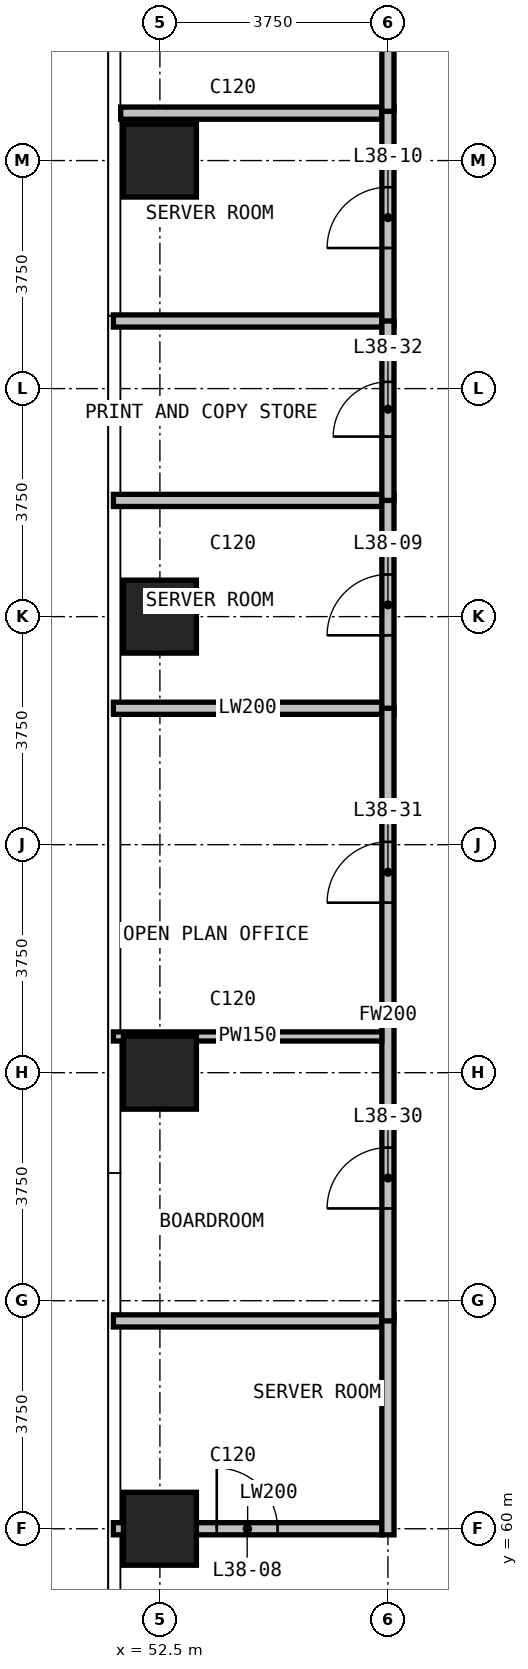
"""IFC4 building model, lengths in metres.
Left out: names, types, materials, properties, quantities, classifications, styles, units other than length and angle.
Written with IfcOpenShell. Run it as: python <this file> out.ifc"""

import sys

from ifc_helpers import new_model, si_unit, direction, frame, frame_2d, origin, origin_2d, place, context, subcontext, project, spatial, rectangle, extrude, element, fill, save


model = new_model("IFC4")
c1 = context("Model", 3, precision=1e-05, world=origin(), true_north=direction((0.0, 1.0)))
c2 = subcontext(c1, "Body", "Model", "MODEL_VIEW")
j1 = project(units=[si_unit("LENGTHUNIT", "METRE"), si_unit("PLANEANGLEUNIT", "RADIAN")], contexts=[c1])
p1 = place(None, origin())
s1 = spatial("IfcSite", under=j1, at=p1, CompositionType="ELEMENT")
p2 = place(p1, origin())
s2 = spatial("IfcBuilding", under=s1, at=p2, CompositionType="ELEMENT")
p3 = place(p2, frame((0.0, 0.0, 151.3)))
s3 = spatial("IfcBuildingStorey", under=s2, at=p3, CompositionType="ELEMENT", Elevation=151.3)
for number, where, z_axis, x_axis in (
    (1, (52.5, 60.0, 0.0), (0.0, 0.0, 1.0), (1.0, 0.0, 0.0)),
    (2, (52.5, 67.5, 0.0), (0.0, 0.0, 1.0), (1.0, 0.0, 0.0)),
    (3, (52.5, 75.0, 0.0), (0.0, 0.0, 1.0), (1.0, 0.0, 0.0)),
    (4, (52.5, 82.5, 0.0), (0.0, 0.0, 1.0), (1.0, 0.0, 0.0)),
):
    element("IfcColumn", number, at=place(p3, frame(where, z_axis=z_axis, x_axis=x_axis)), inside=s3, PredefinedType="COLUMN", context=c2, shape_type="SweptSolid", body=[
        extrude(rectangle(XDim=1.2, YDim=1.2, at=origin_2d()), origin(), (0.0, 0.0, 1.0), 3.6),
    ])
p4 = place(p3, frame((51.735, 60.0, 0.0), z_axis=(0.0, 0.0, 1.0), x_axis=(1.0, 0.0, 0.0)))
e5 = element("IfcWall", 5, at=p4, inside=s3, PredefinedType="PARTITIONING", context=c2, shape_type="SweptSolid", body=[
    extrude(rectangle(XDim=4.415, YDim=0.2, at=frame_2d((2.208, 0.0))), origin(), (0.0, 0.0, 1.0), 3.3),
])
p5 = place(p4, frame((1.7, 0.0, 0.0)))
e6 = element("IfcOpeningElement", 6, at=p5, cuts=e5, PredefinedType="OPENING", context=c2, shape_type="SweptSolid", body=[
    extrude(rectangle(XDim=1.0, YDim=2.2, at=frame_2d((0.5, 1.1))), frame((0.0, 0.11, 0.0), z_axis=(0.0, -1.0, 0.0), x_axis=(1.0, 0.0, 0.0)), (0.0, 0.0, 1.0), 0.22),
])
for number, where, z_axis, x_axis in (
    (7, (51.735, 63.418, 0.0), (0.0, 0.0, 1.0), (1.0, 0.0, 0.0)),
    (8, (51.735, 73.493, 0.0), (0.0, 0.0, 1.0), (1.0, 0.0, 0.0)),
    (9, (51.735, 76.911, 0.0), (0.0, 0.0, 1.0), (1.0, 0.0, 0.0)),
    (10, (51.735, 79.862, 0.0), (0.0, 0.0, 1.0), (1.0, 0.0, 0.0)),
):
    element("IfcWall", number, at=place(p3, frame(where, z_axis=z_axis, x_axis=x_axis)), inside=s3, PredefinedType="PARTITIONING", context=c2, shape_type="SweptSolid", body=[
        extrude(rectangle(XDim=4.415, YDim=0.2, at=frame_2d((2.208, 0.0))), origin(), (0.0, 0.0, 1.0), 3.3),
    ])
p6 = place(p3, frame((51.855, 83.28, 0.0), z_axis=(0.0, 0.0, 1.0), x_axis=(1.0, 0.0, 0.0)))
e11 = element("IfcWall", 11, at=p6, inside=s3, PredefinedType="PARTITIONING", context=c2, shape_type="SweptSolid", body=[
    extrude(rectangle(XDim=4.295, YDim=0.2, at=frame_2d((2.147, 0.0))), origin(), (0.0, 0.0, 1.0), 3.3),
])
p7 = place(p3, frame((56.25, 59.9, 0.0), z_axis=(0.0, 0.0, 1.0), x_axis=(0.0, 1.0, 0.0)))
e12 = element("IfcWall", 12, at=p7, inside=s3, PredefinedType="PARTITIONING", context=c2, shape_type="SweptSolid", body=[
    extrude(rectangle(XDim=3.618, YDim=0.2, at=frame_2d((1.809, 0.0))), origin(), (0.0, 0.0, 1.0), 3.3),
])
p8 = place(p3, frame((56.25, 73.393, 0.0), z_axis=(0.0, 0.0, 1.0), x_axis=(0.0, 1.0, 0.0)))
e13 = element("IfcWall", 13, at=p8, inside=s3, PredefinedType="PARTITIONING", context=c2, shape_type="SweptSolid", body=[
    extrude(rectangle(XDim=3.618, YDim=0.2, at=frame_2d((1.809, 0.0))), origin(), (0.0, 0.0, 1.0), 3.3),
])
p9 = place(p8, frame((1.3, 0.0, 0.0)))
e14 = element("IfcOpeningElement", 14, at=p9, cuts=e13, PredefinedType="OPENING", context=c2, shape_type="SweptSolid", body=[
    extrude(rectangle(XDim=1.0, YDim=2.2, at=frame_2d((0.5, 1.1))), frame((0.0, 0.11, 0.0), z_axis=(0.0, -1.0, 0.0), x_axis=(1.0, 0.0, 0.0)), (0.0, 0.0, 1.0), 0.22),
])
p10 = place(p3, frame((56.25, 79.762, 0.0), z_axis=(0.0, 0.0, 1.0), x_axis=(0.0, 1.0, 0.0)))
e15 = element("IfcWall", 15, at=p10, inside=s3, PredefinedType="PARTITIONING", context=c2, shape_type="SweptSolid", body=[
    extrude(rectangle(XDim=3.618, YDim=0.2, at=frame_2d((1.809, 0.0))), origin(), (0.0, 0.0, 1.0), 3.3),
])
p11 = place(p10, frame((1.3, 0.0, 0.0)))
e16 = element("IfcOpeningElement", 16, at=p11, cuts=e15, PredefinedType="OPENING", context=c2, shape_type="SweptSolid", body=[
    extrude(rectangle(XDim=1.0, YDim=2.2, at=frame_2d((0.5, 1.1))), frame((0.0, 0.11, 0.0), z_axis=(0.0, -1.0, 0.0), x_axis=(1.0, 0.0, 0.0)), (0.0, 0.0, 1.0), 0.22),
])
p12 = place(p3, frame((56.25, 63.418, 0.0), z_axis=(0.0, 0.0, 1.0), x_axis=(0.0, 1.0, 0.0)))
e17 = element("IfcWall", 17, at=p12, inside=s3, PredefinedType="PARTITIONING", context=c2, shape_type="SweptSolid", body=[
    extrude(rectangle(XDim=10.075, YDim=0.2, at=frame_2d((5.038, 0.0))), origin(), (0.0, 0.0, 1.0), 3.3),
])
p13 = place(p12, frame((1.85, 0.0, 0.0)))
e18 = element("IfcOpeningElement", 18, at=p13, cuts=e17, PredefinedType="OPENING", context=c2, shape_type="SweptSolid", body=[
    extrude(rectangle(XDim=1.0, YDim=2.2, at=frame_2d((0.5, 1.1))), frame((0.0, 0.11, 0.0), z_axis=(0.0, -1.0, 0.0), x_axis=(1.0, 0.0, 0.0)), (0.0, 0.0, 1.0), 0.22),
])
p14 = place(p12, frame((6.878, 0.0, 0.0)))
e19 = element("IfcOpeningElement", 19, at=p14, cuts=e17, PredefinedType="OPENING", context=c2, shape_type="SweptSolid", body=[
    extrude(rectangle(XDim=1.0, YDim=2.2, at=frame_2d((0.5, 1.1))), frame((0.0, 0.11, 0.0), z_axis=(0.0, -1.0, 0.0), x_axis=(1.0, 0.0, 0.0)), (0.0, 0.0, 1.0), 0.22),
])
p15 = place(p3, frame((56.25, 76.911, 0.0), z_axis=(0.0, 0.0, 1.0), x_axis=(0.0, 1.0, 0.0)))
e20 = element("IfcWall", 20, at=p15, inside=s3, PredefinedType="PARTITIONING", context=c2, shape_type="SweptSolid", body=[
    extrude(rectangle(XDim=2.951, YDim=0.2, at=frame_2d((1.476, 0.0))), origin(), (0.0, 0.0, 1.0), 3.3),
])
p16 = place(p15, frame((1.05, 0.0, 0.0)))
e21 = element("IfcOpeningElement", 21, at=p16, cuts=e20, PredefinedType="OPENING", context=c2, shape_type="SweptSolid", body=[
    extrude(rectangle(XDim=0.9, YDim=2.2, at=frame_2d((0.45, 1.1))), frame((0.0, 0.11, 0.0), z_axis=(0.0, -1.0, 0.0), x_axis=(1.0, 0.0, 0.0)), (0.0, 0.0, 1.0), 0.22),
])
p17 = place(p3, frame((56.25, 83.31, 0.0), z_axis=(0.0, 0.0, 1.0), x_axis=(0.0, 1.0, 0.0)))
e22 = element("IfcWall", 22, at=p17, inside=s3, PredefinedType="PARTITIONING", context=c2, shape_type="SweptSolid", body=[
    extrude(rectangle(XDim=7.335, YDim=0.2, at=frame_2d((3.667, 0.0))), origin(), (0.0, 0.0, 1.0), 3.3),
])
p18 = place(p3, frame((51.735, 68.096, 0.0), z_axis=(0.0, 0.0, 1.0), x_axis=(1.0, 0.0, 0.0)))
e23 = element("IfcWall", 23, at=p18, inside=s3, PredefinedType="PARTITIONING", context=c2, shape_type="SweptSolid", body=[
    extrude(rectangle(XDim=4.415, YDim=0.15, at=frame_2d((2.208, 0.0))), origin(), (0.0, 0.0, 1.0), 3.3),
])
p19 = place(p5, origin())
e24 = element("IfcDoor", 24, at=p19, inside=s3, OperationType="SINGLE_SWING_RIGHT", PredefinedType="DOOR", context=c2, shape_type="SweptSolid", body=[
    extrude(rectangle(XDim=1.0, YDim=2.2, at=frame_2d((0.5, 1.1))), frame((0.0, 0.025, 0.0), z_axis=(0.0, -1.0, 0.0), x_axis=(1.0, 0.0, 0.0)), (0.0, 0.0, 1.0), 0.05),
])
fill(e6, e24)
p20 = place(p9, origin())
e25 = element("IfcDoor", 25, at=p20, inside=s3, OperationType="SINGLE_SWING_RIGHT", PredefinedType="DOOR", context=c2, shape_type="SweptSolid", body=[
    extrude(rectangle(XDim=1.0, YDim=2.2, at=frame_2d((0.5, 1.1))), frame((0.0, 0.025, 0.0), z_axis=(0.0, -1.0, 0.0), x_axis=(1.0, 0.0, 0.0)), (0.0, 0.0, 1.0), 0.05),
])
fill(e14, e25)
p21 = place(p11, origin())
e26 = element("IfcDoor", 26, at=p21, inside=s3, OperationType="SINGLE_SWING_LEFT", PredefinedType="DOOR", context=c2, shape_type="SweptSolid", body=[
    extrude(rectangle(XDim=1.0, YDim=2.2, at=frame_2d((0.5, 1.1))), frame((0.0, 0.025, 0.0), z_axis=(0.0, -1.0, 0.0), x_axis=(1.0, 0.0, 0.0)), (0.0, 0.0, 1.0), 0.05),
])
fill(e16, e26)
p22 = place(p13, origin())
e27 = element("IfcDoor", 27, at=p22, inside=s3, OperationType="SINGLE_SWING_RIGHT", PredefinedType="DOOR", context=c2, shape_type="SweptSolid", body=[
    extrude(rectangle(XDim=1.0, YDim=2.2, at=frame_2d((0.5, 1.1))), frame((0.0, 0.025, 0.0), z_axis=(0.0, -1.0, 0.0), x_axis=(1.0, 0.0, 0.0)), (0.0, 0.0, 1.0), 0.05),
])
fill(e18, e27)
p23 = place(p14, origin())
e28 = element("IfcDoor", 28, at=p23, inside=s3, OperationType="SINGLE_SWING_LEFT", PredefinedType="DOOR", context=c2, shape_type="SweptSolid", body=[
    extrude(rectangle(XDim=1.0, YDim=2.2, at=frame_2d((0.5, 1.1))), frame((0.0, 0.025, 0.0), z_axis=(0.0, -1.0, 0.0), x_axis=(1.0, 0.0, 0.0)), (0.0, 0.0, 1.0), 0.05),
])
fill(e19, e28)
p24 = place(p16, origin())
e29 = element("IfcDoor", 29, at=p24, inside=s3, OperationType="SINGLE_SWING_LEFT", PredefinedType="DOOR", context=c2, shape_type="SweptSolid", body=[
    extrude(rectangle(XDim=0.9, YDim=2.2, at=frame_2d((0.45, 1.1))), frame((0.0, 0.025, 0.0), z_axis=(0.0, -1.0, 0.0), x_axis=(1.0, 0.0, 0.0)), (0.0, 0.0, 1.0), 0.05),
])
fill(e21, e29)
save(model, sys.argv[1])
